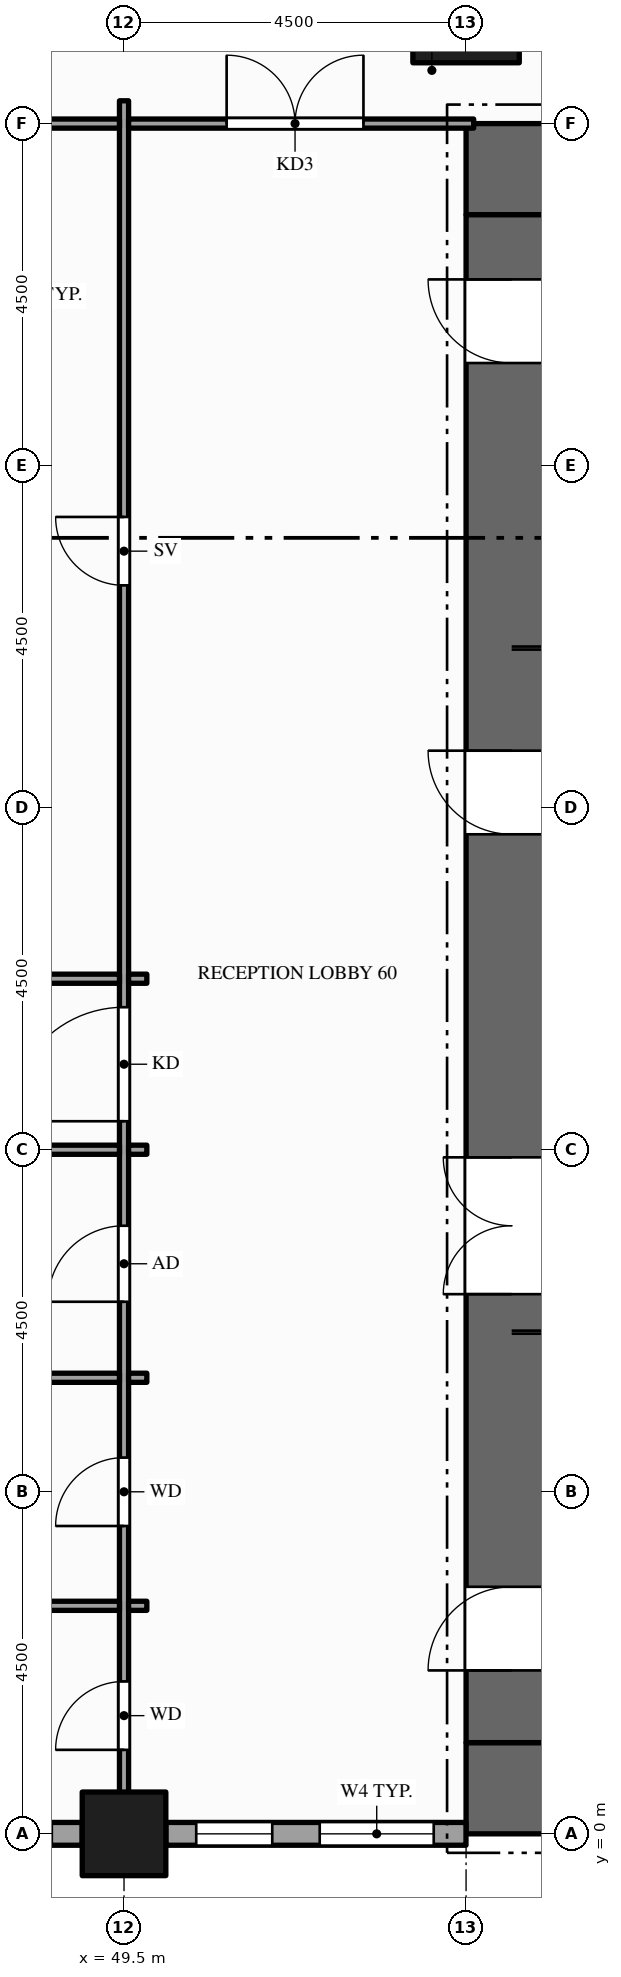
"""IFC4 building model, lengths in metres.
Left out: names, types, materials, properties, quantities, classifications, styles, units other than length and angle.
Written with IfcOpenShell. Run it as: python <this file> out.ifc"""

import sys

from ifc_helpers import new_model, si_unit, direction, frame, frame_2d, origin, origin_2d, place, context, subcontext, project, spatial, rectangle, hollow_rectangle, extrude, element, fill, save


model = new_model("IFC4")
c1 = context("Model", 3, precision=1e-05, world=origin(), true_north=direction((0.0, 1.0)))
c2 = subcontext(c1, "Body", "Model", "MODEL_VIEW")
j1 = project(units=[si_unit("LENGTHUNIT", "METRE"), si_unit("PLANEANGLEUNIT", "RADIAN")], contexts=[c1])
p1 = place(None, origin())
s1 = spatial("IfcSite", under=j1, at=p1, CompositionType="ELEMENT")
p2 = place(p1, origin())
s2 = spatial("IfcBuilding", under=s1, at=p2, CompositionType="ELEMENT")
p3 = place(p2, frame((0.0, 0.0, 14.0)))
s3 = spatial("IfcBuildingStorey", under=s2, at=p3, CompositionType="ELEMENT", Elevation=14.0)
for number, where, z_axis, x_axis in (
    (1, (67.5, 0.6, -0.15), (0.0, 0.0, 1.0), (-1.0, 0.0, 0.0)),
    (2, (54.0, 21.9, -0.15), (0.0, 0.0, 1.0), (1.0, 0.0, 0.0)),
):
    element("IfcWall", number, at=place(p3, frame(where, z_axis=z_axis, x_axis=x_axis)), inside=s3, PredefinedType="SHEAR", context=c2, shape_type="SweptSolid", body=[
        extrude(rectangle(XDim=13.5, YDim=1.2, at=frame_2d((6.75, 0.0))), origin(), (0.0, 0.0, 1.0), 5.0),
    ])
p4 = place(p3, frame((54.6, 1.2, -0.15), z_axis=(0.0, 0.0, 1.0), x_axis=(0.0, 1.0, 0.0)))
e3 = element("IfcWall", 3, at=p4, inside=s3, PredefinedType="SHEAR", context=c2, shape_type="SweptSolid", body=[
    extrude(rectangle(XDim=20.1, YDim=1.2, at=frame_2d((10.05, 0.0))), origin(), (0.0, 0.0, 1.0), 5.0),
])
p5 = place(p4, frame((5.9, 0.0, 0.15)))
e4 = element("IfcOpeningElement", 4, at=p5, cuts=e3, PredefinedType="OPENING", context=c2, shape_type="SweptSolid", body=[
    extrude(rectangle(XDim=1.8, YDim=2.1, at=frame_2d((0.9, 1.05))), frame((0.0, 0.61, 0.0), z_axis=(0.0, -1.0, 0.0), x_axis=(1.0, 0.0, 0.0)), (0.0, 0.0, 1.0), 1.22),
])
p6 = place(p4, frame((11.95, 0.0, 0.15)))
e5 = element("IfcOpeningElement", 5, at=p6, cuts=e3, PredefinedType="OPENING", context=c2, shape_type="SweptSolid", body=[
    extrude(rectangle(XDim=1.1, YDim=2.1, at=frame_2d((0.55, 1.05))), frame((0.0, 0.61, 0.0), z_axis=(0.0, -1.0, 0.0), x_axis=(1.0, 0.0, 0.0)), (0.0, 0.0, 1.0), 1.22),
])
p7 = place(p4, frame((0.95, 0.0, 0.15)))
e6 = element("IfcOpeningElement", 6, at=p7, cuts=e3, PredefinedType="OPENING", context=c2, shape_type="SweptSolid", body=[
    extrude(rectangle(XDim=1.1, YDim=2.1, at=frame_2d((0.55, 1.05))), frame((0.0, 0.61, 0.0), z_axis=(0.0, -1.0, 0.0), x_axis=(1.0, 0.0, 0.0)), (0.0, 0.0, 1.0), 1.22),
])
p8 = place(p4, frame((18.15, 0.0, 0.15)))
e7 = element("IfcOpeningElement", 7, at=p8, cuts=e3, PredefinedType="OPENING", context=c2, shape_type="SweptSolid", body=[
    extrude(rectangle(XDim=1.1, YDim=2.1, at=frame_2d((0.55, 1.05))), frame((0.0, 0.61, 0.0), z_axis=(0.0, -1.0, 0.0), x_axis=(1.0, 0.0, 0.0)), (0.0, 0.0, 1.0), 1.22),
])
p9 = place(p3, frame((49.5, 0.0, -0.25), z_axis=(0.0, 0.0, 1.0), x_axis=(1.0, 0.0, 0.0)))
e8 = element("IfcColumn", 8, at=p9, inside=s3, PredefinedType="COLUMN", context=c2, shape_type="SweptSolid", body=[
    extrude(hollow_rectangle(XDim=1.1, YDim=1.1, WallThickness=0.06, at=origin_2d()), origin(), (0.0, 0.0, 1.0), 5.0),
])
p10 = place(p3, frame((54.0, 24.0, -0.25), z_axis=(0.0, 0.0, 1.0), x_axis=(1.0, 0.0, 0.0)))
e9 = element("IfcColumn", 9, at=p10, inside=s3, PredefinedType="COLUMN", context=c2, shape_type="SweptSolid", body=[
    extrude(hollow_rectangle(XDim=1.4, YDim=1.4, WallThickness=0.08, at=origin_2d()), origin(), (0.0, 0.0, 1.0), 5.0),
])
p11 = place(p3, frame((45.55, 0.0, 0.0), z_axis=(0.0, 0.0, 1.0), x_axis=(1.0, 0.0, 0.0)))
e10 = element("IfcWall", 10, at=p11, inside=s3, PredefinedType="STANDARD", context=c2, shape_type="SweptSolid", body=[
    extrude(rectangle(XDim=3.4, YDim=0.3, at=frame_2d((1.7, 0.0))), origin(), (0.0, 0.0, 1.0), 4.036),
])
p12 = place(p11, frame((0.4, 0.0, 0.9)))
e11 = element("IfcOpeningElement", 11, at=p12, cuts=e10, PredefinedType="OPENING", context=c2, shape_type="SweptSolid", body=[
    extrude(rectangle(XDim=1.0, YDim=2.75, at=frame_2d((0.5, 1.375))), frame((0.0, 0.16, 0.0), z_axis=(0.0, -1.0, 0.0), x_axis=(1.0, 0.0, 0.0)), (0.0, 0.0, 1.0), 0.32),
])
p13 = place(p11, frame((2.0, 0.0, 0.9)))
e12 = element("IfcOpeningElement", 12, at=p13, cuts=e10, PredefinedType="OPENING", context=c2, shape_type="SweptSolid", body=[
    extrude(rectangle(XDim=1.0, YDim=2.75, at=frame_2d((0.5, 1.375))), frame((0.0, 0.16, 0.0), z_axis=(0.0, -1.0, 0.0), x_axis=(1.0, 0.0, 0.0)), (0.0, 0.0, 1.0), 0.32),
])
p14 = place(p3, frame((50.05, 0.0, 0.0), z_axis=(0.0, 0.0, 1.0), x_axis=(1.0, 0.0, 0.0)))
e13 = element("IfcWall", 13, at=p14, inside=s3, PredefinedType="STANDARD", context=c2, shape_type="SweptSolid", body=[
    extrude(rectangle(XDim=3.949, YDim=0.3, at=frame_2d((1.975, 0.0))), origin(), (0.0, 0.0, 1.0), 4.036),
])
p15 = place(p14, frame((0.4, 0.0, 0.9)))
e14 = element("IfcOpeningElement", 14, at=p15, cuts=e13, PredefinedType="OPENING", context=c2, shape_type="SweptSolid", body=[
    extrude(rectangle(XDim=1.0, YDim=2.75, at=frame_2d((0.5, 1.375))), frame((0.0, 0.16, 0.0), z_axis=(0.0, -1.0, 0.0), x_axis=(1.0, 0.0, 0.0)), (0.0, 0.0, 1.0), 0.32),
])
p16 = place(p14, frame((2.024, 0.0, 0.9)))
e15 = element("IfcOpeningElement", 15, at=p16, cuts=e13, PredefinedType="OPENING", context=c2, shape_type="SweptSolid", body=[
    extrude(rectangle(XDim=1.5, YDim=2.75, at=frame_2d((0.75, 1.375))), frame((0.0, 0.16, 0.0), z_axis=(0.0, -1.0, 0.0), x_axis=(1.0, 0.0, 0.0)), (0.0, 0.0, 1.0), 0.32),
])
p17 = place(p3, frame((49.5, 0.15, 0.0), z_axis=(0.0, 0.0, 1.0), x_axis=(0.0, 1.0, 0.0)))
e16 = element("IfcWall", 16, at=p17, inside=s3, PredefinedType="PARTITIONING", context=c2, shape_type="SweptSolid", body=[
    extrude(rectangle(XDim=22.65, YDim=0.12, at=frame_2d((11.325, 0.0))), origin(), (0.0, 0.0, 1.0), 3.759),
])
p18 = place(p17, frame((0.955, 0.0, 0.0)))
e17 = element("IfcOpeningElement", 17, at=p18, cuts=e16, PredefinedType="OPENING", context=c2, shape_type="SweptSolid", body=[
    extrude(rectangle(XDim=0.9, YDim=2.1, at=frame_2d((0.45, 1.05))), frame((0.0, 0.07, 0.0), z_axis=(0.0, -1.0, 0.0), x_axis=(1.0, 0.0, 0.0)), (0.0, 0.0, 1.0), 0.14),
])
p19 = place(p17, frame((3.9, 0.0, 0.0)))
e18 = element("IfcOpeningElement", 18, at=p19, cuts=e16, PredefinedType="OPENING", context=c2, shape_type="SweptSolid", body=[
    extrude(rectangle(XDim=0.9, YDim=2.1, at=frame_2d((0.45, 1.05))), frame((0.0, 0.07, 0.0), z_axis=(0.0, -1.0, 0.0), x_axis=(1.0, 0.0, 0.0)), (0.0, 0.0, 1.0), 0.14),
])
p20 = place(p17, frame((6.85, 0.0, 0.0)))
e19 = element("IfcOpeningElement", 19, at=p20, cuts=e16, PredefinedType="OPENING", context=c2, shape_type="SweptSolid", body=[
    extrude(rectangle(XDim=1.0, YDim=2.1, at=frame_2d((0.5, 1.05))), frame((0.0, 0.07, 0.0), z_axis=(0.0, -1.0, 0.0), x_axis=(1.0, 0.0, 0.0)), (0.0, 0.0, 1.0), 0.14),
])
p21 = place(p17, frame((16.275, 0.0, 0.0)))
e20 = element("IfcOpeningElement", 20, at=p21, cuts=e16, PredefinedType="OPENING", context=c2, shape_type="SweptSolid", body=[
    extrude(rectangle(XDim=0.9, YDim=2.1, at=frame_2d((0.45, 1.05))), frame((0.0, 0.07, 0.0), z_axis=(0.0, -1.0, 0.0), x_axis=(1.0, 0.0, 0.0)), (0.0, 0.0, 1.0), 0.14),
])
p22 = place(p17, frame((9.225, 0.0, 0.0)))
e21 = element("IfcOpeningElement", 21, at=p22, cuts=e16, PredefinedType="OPENING", context=c2, shape_type="SweptSolid", body=[
    extrude(rectangle(XDim=1.5, YDim=2.1, at=frame_2d((0.75, 1.05))), frame((0.0, 0.07, 0.0), z_axis=(0.0, -1.0, 0.0), x_axis=(1.0, 0.0, 0.0)), (0.0, 0.0, 1.0), 0.14),
])
p23 = place(p3, frame((45.06, 3.0, 0.0), z_axis=(0.0, 0.0, 1.0), x_axis=(1.0, 0.0, 0.0)))
e22 = element("IfcWall", 22, at=p23, inside=s3, PredefinedType="PARTITIONING", context=c2, shape_type="SweptSolid", body=[
    extrude(rectangle(XDim=4.38, YDim=0.12, at=frame_2d((2.19, 0.0))), origin(), (0.0, 0.0, 1.0), 3.66),
])
p24 = place(p3, frame((49.56, 3.0, 0.0), z_axis=(0.0, 0.0, 1.0), x_axis=(1.0, 0.0, 0.0)))
e23 = element("IfcWall", 23, at=p24, inside=s3, PredefinedType="PARTITIONING", context=c2, shape_type="SweptSolid", body=[
    extrude(rectangle(XDim=0.24, YDim=0.12, at=frame_2d((0.12, 0.0))), origin(), (0.0, 0.0, 1.0), 3.759),
])
p25 = place(p3, frame((45.06, 6.0, 0.0), z_axis=(0.0, 0.0, 1.0), x_axis=(1.0, 0.0, 0.0)))
e24 = element("IfcWall", 24, at=p25, inside=s3, PredefinedType="PARTITIONING", context=c2, shape_type="SweptSolid", body=[
    extrude(rectangle(XDim=4.38, YDim=0.12, at=frame_2d((2.19, 0.0))), origin(), (0.0, 0.0, 1.0), 3.66),
])
p26 = place(p3, frame((49.56, 6.0, 0.0), z_axis=(0.0, 0.0, 1.0), x_axis=(1.0, 0.0, 0.0)))
e25 = element("IfcWall", 25, at=p26, inside=s3, PredefinedType="PARTITIONING", context=c2, shape_type="SweptSolid", body=[
    extrude(rectangle(XDim=0.24, YDim=0.12, at=frame_2d((0.12, 0.0))), origin(), (0.0, 0.0, 1.0), 3.759),
])
p27 = place(p3, frame((45.06, 9.0, 0.0), z_axis=(0.0, 0.0, 1.0), x_axis=(1.0, 0.0, 0.0)))
e26 = element("IfcWall", 26, at=p27, inside=s3, PredefinedType="PARTITIONING", context=c2, shape_type="SweptSolid", body=[
    extrude(rectangle(XDim=4.38, YDim=0.12, at=frame_2d((2.19, 0.0))), origin(), (0.0, 0.0, 1.0), 3.66),
])
p28 = place(p3, frame((49.56, 9.0, 0.0), z_axis=(0.0, 0.0, 1.0), x_axis=(1.0, 0.0, 0.0)))
e27 = element("IfcWall", 27, at=p28, inside=s3, PredefinedType="PARTITIONING", context=c2, shape_type="SweptSolid", body=[
    extrude(rectangle(XDim=0.24, YDim=0.12, at=frame_2d((0.12, 0.0))), origin(), (0.0, 0.0, 1.0), 3.759),
])
p29 = place(p3, frame((45.06, 11.25, 0.0), z_axis=(0.0, 0.0, 1.0), x_axis=(1.0, 0.0, 0.0)))
e28 = element("IfcWall", 28, at=p29, inside=s3, PredefinedType="PARTITIONING", context=c2, shape_type="SweptSolid", body=[
    extrude(rectangle(XDim=4.38, YDim=0.12, at=frame_2d((2.19, 0.0))), origin(), (0.0, 0.0, 1.0), 3.66),
])
p30 = place(p3, frame((49.56, 11.25, 0.0), z_axis=(0.0, 0.0, 1.0), x_axis=(1.0, 0.0, 0.0)))
e29 = element("IfcWall", 29, at=p30, inside=s3, PredefinedType="PARTITIONING", context=c2, shape_type="SweptSolid", body=[
    extrude(rectangle(XDim=0.24, YDim=0.12, at=frame_2d((0.12, 0.0))), origin(), (0.0, 0.0, 1.0), 3.759),
])
p31 = place(p3, frame((45.06, 22.5, 0.0), z_axis=(0.0, 0.0, 1.0), x_axis=(1.0, 0.0, 0.0)))
e30 = element("IfcWall", 30, at=p31, inside=s3, PredefinedType="PARTITIONING", context=c2, shape_type="SweptSolid", body=[
    extrude(rectangle(XDim=4.38, YDim=0.12, at=frame_2d((2.19, 0.0))), origin(), (0.0, 0.0, 1.0), 3.66),
])
p32 = place(p3, frame((49.56, 22.5, 0.0), z_axis=(0.0, 0.0, 1.0), x_axis=(1.0, 0.0, 0.0)))
e31 = element("IfcWall", 31, at=p32, inside=s3, PredefinedType="PARTITIONING", context=c2, shape_type="SweptSolid", body=[
    extrude(rectangle(XDim=4.54, YDim=0.12, at=frame_2d((2.27, 0.0))), origin(), (0.0, 0.0, 1.0), 3.66),
])
p33 = place(p32, frame((1.29, 0.0, 0.0)))
e32 = element("IfcOpeningElement", 32, at=p33, cuts=e31, PredefinedType="OPENING", context=c2, shape_type="SweptSolid", body=[
    extrude(rectangle(XDim=1.8, YDim=2.1, at=frame_2d((0.9, 1.05))), frame((0.0, 0.07, 0.0), z_axis=(0.0, -1.0, 0.0), x_axis=(1.0, 0.0, 0.0)), (0.0, 0.0, 1.0), 0.14),
])
p34 = place(p15, origin())
e33 = element("IfcWindow", 33, at=p34, inside=s3, PartitioningType="SINGLE_PANEL", PredefinedType="WINDOW", context=c2, shape_type="SweptSolid", body=[
    extrude(rectangle(XDim=1.0, YDim=2.75, at=frame_2d((0.5, 1.375))), frame((0.0, 0.03, 0.0), z_axis=(0.0, -1.0, 0.0), x_axis=(1.0, 0.0, 0.0)), (0.0, 0.0, 1.0), 0.06),
])
fill(e14, e33)
p35 = place(p16, origin())
e34 = element("IfcWindow", 34, at=p35, inside=s3, PartitioningType="SINGLE_PANEL", PredefinedType="WINDOW", context=c2, shape_type="SweptSolid", body=[
    extrude(rectangle(XDim=1.5, YDim=2.75, at=frame_2d((0.75, 1.375))), frame((0.0, 0.03, 0.0), z_axis=(0.0, -1.0, 0.0), x_axis=(1.0, 0.0, 0.0)), (0.0, 0.0, 1.0), 0.06),
])
fill(e15, e34)
p36 = place(p5, origin())
e35 = element("IfcDoor", 35, at=p36, inside=s3, OperationType="DOUBLE_DOOR_SINGLE_SWING", PredefinedType="DOOR", context=c2, shape_type="SweptSolid", body=[
    extrude(rectangle(XDim=1.8, YDim=2.1, at=frame_2d((0.9, 1.05))), frame((0.0, 0.025, 0.0), z_axis=(0.0, -1.0, 0.0), x_axis=(1.0, 0.0, 0.0)), (0.0, 0.0, 1.0), 0.05),
])
fill(e4, e35)
p37 = place(p6, origin())
e36 = element("IfcDoor", 36, at=p37, inside=s3, OperationType="SINGLE_SWING_RIGHT", PredefinedType="DOOR", context=c2, shape_type="SweptSolid", body=[
    extrude(rectangle(XDim=1.1, YDim=2.1, at=frame_2d((0.55, 1.05))), frame((0.0, 0.025, 0.0), z_axis=(0.0, -1.0, 0.0), x_axis=(1.0, 0.0, 0.0)), (0.0, 0.0, 1.0), 0.05),
])
fill(e5, e36)
p38 = place(p7, origin())
e37 = element("IfcDoor", 37, at=p38, inside=s3, OperationType="SINGLE_SWING_LEFT", PredefinedType="DOOR", context=c2, shape_type="SweptSolid", body=[
    extrude(rectangle(XDim=1.1, YDim=2.1, at=frame_2d((0.55, 1.05))), frame((0.0, 0.025, 0.0), z_axis=(0.0, -1.0, 0.0), x_axis=(1.0, 0.0, 0.0)), (0.0, 0.0, 1.0), 0.05),
])
fill(e6, e37)
p39 = place(p8, origin())
e38 = element("IfcDoor", 38, at=p39, inside=s3, OperationType="SINGLE_SWING_RIGHT", PredefinedType="DOOR", context=c2, shape_type="SweptSolid", body=[
    extrude(rectangle(XDim=1.1, YDim=2.1, at=frame_2d((0.55, 1.05))), frame((0.0, 0.025, 0.0), z_axis=(0.0, -1.0, 0.0), x_axis=(1.0, 0.0, 0.0)), (0.0, 0.0, 1.0), 0.05),
])
fill(e7, e38)
p40 = place(p18, origin())
e39 = element("IfcDoor", 39, at=p40, inside=s3, OperationType="SINGLE_SWING_LEFT", PredefinedType="DOOR", context=c2, shape_type="SweptSolid", body=[
    extrude(rectangle(XDim=0.9, YDim=2.1, at=frame_2d((0.45, 1.05))), frame((0.0, 0.025, 0.0), z_axis=(0.0, -1.0, 0.0), x_axis=(1.0, 0.0, 0.0)), (0.0, 0.0, 1.0), 0.05),
])
fill(e17, e39)
p41 = place(p19, origin())
e40 = element("IfcDoor", 40, at=p41, inside=s3, OperationType="SINGLE_SWING_LEFT", PredefinedType="DOOR", context=c2, shape_type="SweptSolid", body=[
    extrude(rectangle(XDim=0.9, YDim=2.1, at=frame_2d((0.45, 1.05))), frame((0.0, 0.025, 0.0), z_axis=(0.0, -1.0, 0.0), x_axis=(1.0, 0.0, 0.0)), (0.0, 0.0, 1.0), 0.05),
])
fill(e18, e40)
p42 = place(p20, origin())
e41 = element("IfcDoor", 41, at=p42, inside=s3, OperationType="SINGLE_SWING_LEFT", PredefinedType="DOOR", context=c2, shape_type="SweptSolid", body=[
    extrude(rectangle(XDim=1.0, YDim=2.1, at=frame_2d((0.5, 1.05))), frame((0.0, 0.025, 0.0), z_axis=(0.0, -1.0, 0.0), x_axis=(1.0, 0.0, 0.0)), (0.0, 0.0, 1.0), 0.05),
])
fill(e19, e41)
p43 = place(p21, origin())
e42 = element("IfcDoor", 42, at=p43, inside=s3, OperationType="SINGLE_SWING_RIGHT", PredefinedType="DOOR", context=c2, shape_type="SweptSolid", body=[
    extrude(rectangle(XDim=0.9, YDim=2.1, at=frame_2d((0.45, 1.05))), frame((0.0, 0.025, 0.0), z_axis=(0.0, -1.0, 0.0), x_axis=(1.0, 0.0, 0.0)), (0.0, 0.0, 1.0), 0.05),
])
fill(e20, e42)
p44 = place(p22, origin())
e43 = element("IfcDoor", 43, at=p44, inside=s3, OperationType="SINGLE_SWING_LEFT", PredefinedType="DOOR", context=c2, shape_type="SweptSolid", body=[
    extrude(rectangle(XDim=1.5, YDim=2.1, at=frame_2d((0.75, 1.05))), frame((0.0, 0.025, 0.0), z_axis=(0.0, -1.0, 0.0), x_axis=(1.0, 0.0, 0.0)), (0.0, 0.0, 1.0), 0.05),
])
fill(e21, e43)
p45 = place(p33, origin())
e44 = element("IfcDoor", 44, at=p45, inside=s3, OperationType="DOUBLE_DOOR_SINGLE_SWING", PredefinedType="DOOR", context=c2, shape_type="SweptSolid", body=[
    extrude(rectangle(XDim=1.8, YDim=2.1, at=frame_2d((0.9, 1.05))), frame((0.0, 0.025, 0.0), z_axis=(0.0, -1.0, 0.0), x_axis=(1.0, 0.0, 0.0)), (0.0, 0.0, 1.0), 0.05),
])
fill(e32, e44)
save(model, sys.argv[1])
